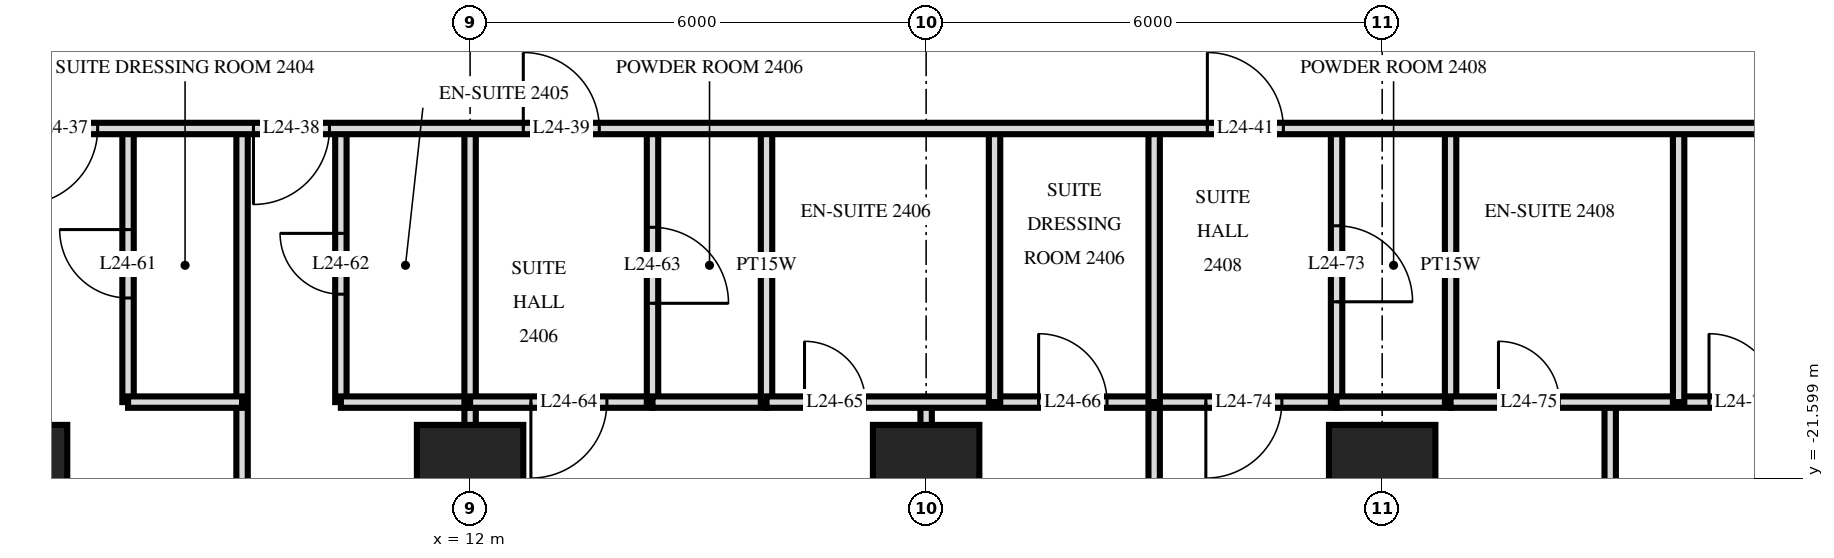
"""IFC4 building model, lengths in metres.
Left out: names, types, materials, properties, quantities, classifications, styles, units other than length and angle.
Written with IfcOpenShell. Run it as: python <this file> out.ifc"""

import sys

from ifc_helpers import new_model, si_unit, direction, frame, frame_2d, origin, origin_2d, place, context, subcontext, project, spatial, rectangle, extrude, element, fill, save


model = new_model("IFC4")
c1 = context("Model", 3, precision=1e-05, world=origin(), true_north=direction((0.0, 1.0)))
c2 = subcontext(c1, "Body", "Model", "MODEL_VIEW")
j1 = project(units=[si_unit("LENGTHUNIT", "METRE"), si_unit("PLANEANGLEUNIT", "RADIAN")], contexts=[c1])
p1 = place(None, origin())
s1 = spatial("IfcSite", under=j1, at=p1, CompositionType="ELEMENT")
p2 = place(p1, origin())
s2 = spatial("IfcBuilding", under=s1, at=p2, CompositionType="ELEMENT")
p3 = place(p2, frame((0.0, 0.0, 96.0)))
s3 = spatial("IfcBuildingStorey", under=s2, at=p3, CompositionType="ELEMENT", Elevation=96.0)
for number, where, z_axis, x_axis in (
    (1, (6.0, -21.6, 0.0), (0.0, 0.0, 1.0), (1.0, 0.0, 0.0)),
    (2, (12.0, -21.6, 0.0), (0.0, 0.0, 1.0), (1.0, 0.0, 0.0)),
    (3, (18.0, -21.6, 0.0), (0.0, 0.0, 1.0), (1.0, 0.0, 0.0)),
    (4, (24.0, -21.6, 0.0), (0.0, 0.0, 1.0), (1.0, 0.0, 0.0)),
):
    element("IfcColumn", number, at=place(p3, frame(where, z_axis=z_axis, x_axis=x_axis)), inside=s3, PredefinedType="COLUMN", context=c2, shape_type="SweptSolid", body=[
        extrude(rectangle(XDim=1.4, YDim=1.4, at=origin_2d()), origin(), (0.0, 0.0, 1.0), 3.6),
    ])
p4 = place(p3, frame((27.9, -20.6, 0.0), z_axis=(0.0, 0.0, 1.0), x_axis=(0.0, 1.0, 0.0)))
e5 = element("IfcWall", 5, at=p4, inside=s3, PredefinedType="PARTITIONING", context=c2, shape_type="SweptSolid", body=[
    extrude(rectangle(XDim=3.6, YDim=0.15, at=frame_2d((1.8, 0.0))), origin(), (0.0, 0.0, 1.0), 3.32),
])
p5 = place(p3, frame((27.0, -29.22, 0.0), z_axis=(0.0, 0.0, 1.0), x_axis=(0.0, 1.0, 0.0)))
e6 = element("IfcWall", 6, at=p5, inside=s3, PredefinedType="PARTITIONING", context=c2, shape_type="SweptSolid", body=[
    extrude(rectangle(XDim=8.62, YDim=0.15, at=frame_2d((4.31, 0.0))), origin(), (0.0, 0.0, 1.0), 3.32),
])
p6 = place(p5, frame((3.77, 0.0, 0.0)))
e7 = element("IfcOpeningElement", 7, at=p6, cuts=e6, PredefinedType="OPENING", context=c2, shape_type="SweptSolid", body=[
    extrude(rectangle(XDim=0.9, YDim=2.1, at=frame_2d((0.45, 1.05))), frame((0.0, 0.085, 0.0), z_axis=(0.0, -1.0, 0.0), x_axis=(1.0, 0.0, 0.0)), (0.0, 0.0, 1.0), 0.17),
])
p7 = place(p3, frame((24.9, -20.6, 0.0), z_axis=(0.0, 0.0, 1.0), x_axis=(0.0, 1.0, 0.0)))
e8 = element("IfcWall", 8, at=p7, inside=s3, PredefinedType="PLUMBINGWALL", context=c2, shape_type="SweptSolid", body=[
    extrude(rectangle(XDim=3.6, YDim=0.15, at=frame_2d((1.8, 0.0))), origin(), (0.0, 0.0, 1.0), 3.32),
])
p8 = place(p3, frame((23.4, -20.6, 0.0), z_axis=(0.0, 0.0, 1.0), x_axis=(0.0, 1.0, 0.0)))
e9 = element("IfcWall", 9, at=p8, inside=s3, PredefinedType="PARTITIONING", context=c2, shape_type="SweptSolid", body=[
    extrude(rectangle(XDim=3.6, YDim=0.15, at=frame_2d((1.8, 0.0))), origin(), (0.0, 0.0, 1.0), 3.32),
])
p9 = place(p8, frame((1.32, 0.0, 0.0)))
e10 = element("IfcOpeningElement", 10, at=p9, cuts=e9, PredefinedType="OPENING", context=c2, shape_type="SweptSolid", body=[
    extrude(rectangle(XDim=1.0, YDim=2.1, at=frame_2d((0.5, 1.05))), frame((0.0, 0.085, 0.0), z_axis=(0.0, -1.0, 0.0), x_axis=(1.0, 0.0, 0.0)), (0.0, 0.0, 1.0), 0.17),
])
p10 = place(p3, frame((21.0, -20.6, 0.0), z_axis=(0.0, 0.0, 1.0), x_axis=(0.0, 1.0, 0.0)))
e11 = element("IfcWall", 11, at=p10, inside=s3, PredefinedType="PARTITIONING", context=c2, shape_type="SweptSolid", body=[
    extrude(rectangle(XDim=3.6, YDim=0.15, at=frame_2d((1.8, 0.0))), origin(), (0.0, 0.0, 1.0), 3.32),
])
p11 = place(p3, frame((21.0, -29.22, 0.0), z_axis=(0.0, 0.0, 1.0), x_axis=(0.0, 1.0, 0.0)))
e12 = element("IfcWall", 12, at=p11, inside=s3, PredefinedType="PARTITIONING", context=c2, shape_type="SweptSolid", body=[
    extrude(rectangle(XDim=8.62, YDim=0.15, at=frame_2d((4.31, 0.0))), origin(), (0.0, 0.0, 1.0), 3.32),
])
p12 = place(p3, frame((18.9, -20.6, 0.0), z_axis=(0.0, 0.0, 1.0), x_axis=(0.0, 1.0, 0.0)))
e13 = element("IfcWall", 13, at=p12, inside=s3, PredefinedType="PARTITIONING", context=c2, shape_type="SweptSolid", body=[
    extrude(rectangle(XDim=3.6, YDim=0.15, at=frame_2d((1.8, 0.0))), origin(), (0.0, 0.0, 1.0), 3.32),
])
p13 = place(p3, frame((18.0, -29.22, 0.0), z_axis=(0.0, 0.0, 1.0), x_axis=(0.0, 1.0, 0.0)))
e14 = element("IfcWall", 14, at=p13, inside=s3, PredefinedType="PARTITIONING", context=c2, shape_type="SweptSolid", body=[
    extrude(rectangle(XDim=8.62, YDim=0.15, at=frame_2d((4.31, 0.0))), origin(), (0.0, 0.0, 1.0), 3.32),
])
p14 = place(p13, frame((3.75, 0.0, 0.0)))
e15 = element("IfcOpeningElement", 15, at=p14, cuts=e14, PredefinedType="OPENING", context=c2, shape_type="SweptSolid", body=[
    extrude(rectangle(XDim=0.9, YDim=2.1, at=frame_2d((0.45, 1.05))), frame((0.0, 0.085, 0.0), z_axis=(0.0, -1.0, 0.0), x_axis=(1.0, 0.0, 0.0)), (0.0, 0.0, 1.0), 0.17),
])
p15 = place(p3, frame((15.9, -20.6, 0.0), z_axis=(0.0, 0.0, 1.0), x_axis=(0.0, 1.0, 0.0)))
e16 = element("IfcWall", 16, at=p15, inside=s3, PredefinedType="PLUMBINGWALL", context=c2, shape_type="SweptSolid", body=[
    extrude(rectangle(XDim=3.6, YDim=0.15, at=frame_2d((1.8, 0.0))), origin(), (0.0, 0.0, 1.0), 3.32),
])
p16 = place(p3, frame((14.4, -20.6, 0.0), z_axis=(0.0, 0.0, 1.0), x_axis=(0.0, 1.0, 0.0)))
e17 = element("IfcWall", 17, at=p16, inside=s3, PredefinedType="PARTITIONING", context=c2, shape_type="SweptSolid", body=[
    extrude(rectangle(XDim=3.6, YDim=0.15, at=frame_2d((1.8, 0.0))), origin(), (0.0, 0.0, 1.0), 3.32),
])
p17 = place(p16, frame((1.3, 0.0, 0.0)))
e18 = element("IfcOpeningElement", 18, at=p17, cuts=e17, PredefinedType="OPENING", context=c2, shape_type="SweptSolid", body=[
    extrude(rectangle(XDim=1.0, YDim=2.1, at=frame_2d((0.5, 1.05))), frame((0.0, 0.085, 0.0), z_axis=(0.0, -1.0, 0.0), x_axis=(1.0, 0.0, 0.0)), (0.0, 0.0, 1.0), 0.17),
])
p18 = place(p3, frame((12.0, -20.6, 0.0), z_axis=(0.0, 0.0, 1.0), x_axis=(0.0, 1.0, 0.0)))
e19 = element("IfcWall", 19, at=p18, inside=s3, PredefinedType="PARTITIONING", context=c2, shape_type="SweptSolid", body=[
    extrude(rectangle(XDim=3.6, YDim=0.15, at=frame_2d((1.8, 0.0))), origin(), (0.0, 0.0, 1.0), 3.32),
])
p19 = place(p3, frame((12.0, -29.22, 0.0), z_axis=(0.0, 0.0, 1.0), x_axis=(0.0, 1.0, 0.0)))
e20 = element("IfcWall", 20, at=p19, inside=s3, PredefinedType="PARTITIONING", context=c2, shape_type="SweptSolid", body=[
    extrude(rectangle(XDim=8.62, YDim=0.15, at=frame_2d((4.31, 0.0))), origin(), (0.0, 0.0, 1.0), 3.32),
])
p20 = place(p3, frame((10.3, -20.6, 0.0), z_axis=(0.0, 0.0, 1.0), x_axis=(0.0, 1.0, 0.0)))
e21 = element("IfcWall", 21, at=p20, inside=s3, PredefinedType="PARTITIONING", context=c2, shape_type="SweptSolid", body=[
    extrude(rectangle(XDim=3.6, YDim=0.15, at=frame_2d((1.8, 0.0))), origin(), (0.0, 0.0, 1.0), 3.32),
])
p21 = place(p20, frame((1.42, 0.0, 0.0)))
e22 = element("IfcOpeningElement", 22, at=p21, cuts=e21, PredefinedType="OPENING", context=c2, shape_type="SweptSolid", body=[
    extrude(rectangle(XDim=0.8, YDim=2.1, at=frame_2d((0.4, 1.05))), frame((0.0, 0.085, 0.0), z_axis=(0.0, -1.0, 0.0), x_axis=(1.0, 0.0, 0.0)), (0.0, 0.0, 1.0), 0.17),
])
p22 = place(p3, frame((9.0, -29.22, 0.0), z_axis=(0.0, 0.0, 1.0), x_axis=(0.0, 1.0, 0.0)))
e23 = element("IfcWall", 23, at=p22, inside=s3, PredefinedType="PARTITIONING", context=c2, shape_type="SweptSolid", body=[
    extrude(rectangle(XDim=12.22, YDim=0.15, at=frame_2d((6.11, 0.0))), origin(), (0.0, 0.0, 1.0), 3.32),
])
p23 = place(p3, frame((7.5, -20.6, 0.0), z_axis=(0.0, 0.0, 1.0), x_axis=(0.0, 1.0, 0.0)))
e24 = element("IfcWall", 24, at=p23, inside=s3, PredefinedType="PARTITIONING", context=c2, shape_type="SweptSolid", body=[
    extrude(rectangle(XDim=3.6, YDim=0.15, at=frame_2d((1.8, 0.0))), origin(), (0.0, 0.0, 1.0), 3.32),
])
p24 = place(p23, frame((1.37, 0.0, 0.0)))
e25 = element("IfcOpeningElement", 25, at=p24, cuts=e24, PredefinedType="OPENING", context=c2, shape_type="SweptSolid", body=[
    extrude(rectangle(XDim=0.9, YDim=2.1, at=frame_2d((0.45, 1.05))), frame((0.0, 0.085, 0.0), z_axis=(0.0, -1.0, 0.0), x_axis=(1.0, 0.0, 0.0)), (0.0, 0.0, 1.0), 0.17),
])
p25 = place(p3, frame((12.0, -20.6, 0.0), z_axis=(0.0, 0.0, 1.0), x_axis=(1.0, 0.0, 0.0)))
e26 = element("IfcWall", 26, at=p25, inside=s3, PredefinedType="PARTITIONING", context=c2, shape_type="SweptSolid", body=[
    extrude(rectangle(XDim=2.4, YDim=0.15, at=frame_2d((1.2, 0.0))), origin(), (0.0, 0.0, 1.0), 3.32),
])
p26 = place(p25, frame((0.8, 0.0, 0.0)))
e27 = element("IfcOpeningElement", 27, at=p26, cuts=e26, PredefinedType="OPENING", context=c2, shape_type="SweptSolid", body=[
    extrude(rectangle(XDim=1.0, YDim=2.1, at=frame_2d((0.5, 1.05))), frame((0.0, 0.085, 0.0), z_axis=(0.0, -1.0, 0.0), x_axis=(1.0, 0.0, 0.0)), (0.0, 0.0, 1.0), 0.17),
])
p27 = place(p3, frame((21.0, -20.6, 0.0), z_axis=(0.0, 0.0, 1.0), x_axis=(1.0, 0.0, 0.0)))
e28 = element("IfcWall", 28, at=p27, inside=s3, PredefinedType="PARTITIONING", context=c2, shape_type="SweptSolid", body=[
    extrude(rectangle(XDim=2.4, YDim=0.15, at=frame_2d((1.2, 0.0))), origin(), (0.0, 0.0, 1.0), 3.32),
])
p28 = place(p27, frame((0.68, 0.0, 0.0)))
e29 = element("IfcOpeningElement", 29, at=p28, cuts=e28, PredefinedType="OPENING", context=c2, shape_type="SweptSolid", body=[
    extrude(rectangle(XDim=1.0, YDim=2.1, at=frame_2d((0.5, 1.05))), frame((0.0, 0.085, 0.0), z_axis=(0.0, -1.0, 0.0), x_axis=(1.0, 0.0, 0.0)), (0.0, 0.0, 1.0), 0.17),
])
p29 = place(p3, frame((7.5, -20.6, 0.0), z_axis=(0.0, 0.0, 1.0), x_axis=(1.0, 0.0, 0.0)))
e30 = element("IfcWall", 30, at=p29, inside=s3, PredefinedType="PARTITIONING", context=c2, shape_type="SweptSolid", body=[
    extrude(rectangle(XDim=1.5, YDim=0.15, at=frame_2d((0.75, 0.0))), origin(), (0.0, 0.0, 1.0), 3.32),
])
p30 = place(p3, frame((10.3, -20.6, 0.0), z_axis=(0.0, 0.0, 1.0), x_axis=(1.0, 0.0, 0.0)))
e31 = element("IfcWall", 31, at=p30, inside=s3, PredefinedType="PARTITIONING", context=c2, shape_type="SweptSolid", body=[
    extrude(rectangle(XDim=1.7, YDim=0.15, at=frame_2d((0.85, 0.0))), origin(), (0.0, 0.0, 1.0), 3.32),
])
p31 = place(p3, frame((15.9, -20.6, 0.0), z_axis=(0.0, 0.0, 1.0), x_axis=(1.0, 0.0, 0.0)))
e32 = element("IfcWall", 32, at=p31, inside=s3, PredefinedType="PARTITIONING", context=c2, shape_type="SweptSolid", body=[
    extrude(rectangle(XDim=5.1, YDim=0.15, at=frame_2d((2.55, 0.0))), origin(), (0.0, 0.0, 1.0), 3.32),
])
p32 = place(p31, frame((0.5, 0.0, 0.0)))
e33 = element("IfcOpeningElement", 33, at=p32, cuts=e32, PredefinedType="OPENING", context=c2, shape_type="SweptSolid", body=[
    extrude(rectangle(XDim=0.8, YDim=2.1, at=frame_2d((0.4, 1.05))), frame((0.0, 0.085, 0.0), z_axis=(0.0, -1.0, 0.0), x_axis=(1.0, 0.0, 0.0)), (0.0, 0.0, 1.0), 0.17),
])
p33 = place(p31, frame((3.58, 0.0, 0.0)))
e34 = element("IfcOpeningElement", 34, at=p33, cuts=e32, PredefinedType="OPENING", context=c2, shape_type="SweptSolid", body=[
    extrude(rectangle(XDim=0.9, YDim=2.1, at=frame_2d((0.45, 1.05))), frame((0.0, 0.085, 0.0), z_axis=(0.0, -1.0, 0.0), x_axis=(1.0, 0.0, 0.0)), (0.0, 0.0, 1.0), 0.17),
])
p34 = place(p3, frame((24.9, -20.6, 0.0), z_axis=(0.0, 0.0, 1.0), x_axis=(1.0, 0.0, 0.0)))
e35 = element("IfcWall", 35, at=p34, inside=s3, PredefinedType="PARTITIONING", context=c2, shape_type="SweptSolid", body=[
    extrude(rectangle(XDim=8.22, YDim=0.15, at=frame_2d((4.11, 0.0))), origin(), (0.0, 0.0, 1.0), 3.32),
])
p35 = place(p34, frame((0.63, 0.0, 0.0)))
e36 = element("IfcOpeningElement", 36, at=p35, cuts=e35, PredefinedType="OPENING", context=c2, shape_type="SweptSolid", body=[
    extrude(rectangle(XDim=0.8, YDim=2.1, at=frame_2d((0.4, 1.05))), frame((0.0, 0.085, 0.0), z_axis=(0.0, -1.0, 0.0), x_axis=(1.0, 0.0, 0.0)), (0.0, 0.0, 1.0), 0.17),
])
p36 = place(p34, frame((3.4, 0.0, 0.0)))
e37 = element("IfcOpeningElement", 37, at=p36, cuts=e35, PredefinedType="OPENING", context=c2, shape_type="SweptSolid", body=[
    extrude(rectangle(XDim=0.9, YDim=2.1, at=frame_2d((0.45, 1.05))), frame((0.0, 0.085, 0.0), z_axis=(0.0, -1.0, 0.0), x_axis=(1.0, 0.0, 0.0)), (0.0, 0.0, 1.0), 0.17),
])
for number, where, z_axis, x_axis in (
    (38, (14.4, -20.6, 0.0), (0.0, 0.0, 1.0), (1.0, 0.0, 0.0)),
    (39, (23.4, -20.6, 0.0), (0.0, 0.0, 1.0), (1.0, 0.0, 0.0)),
):
    element("IfcWall", number, at=place(p3, frame(where, z_axis=z_axis, x_axis=x_axis)), inside=s3, PredefinedType="PLUMBINGWALL", context=c2, shape_type="SweptSolid", body=[
        extrude(rectangle(XDim=1.5, YDim=0.15, at=frame_2d((0.75, 0.0))), origin(), (0.0, 0.0, 1.0), 3.32),
    ])
p37 = place(p3, frame((-33.12, -17.0, 0.0), z_axis=(0.0, 0.0, 1.0), x_axis=(1.0, 0.0, 0.0)))
e40 = element("IfcWall", 40, at=p37, inside=s3, PredefinedType="PARTITIONING", context=c2, shape_type="SweptSolid", body=[
    extrude(rectangle(XDim=66.24, YDim=0.15, at=frame_2d((33.12, 0.0))), origin(), (0.0, 0.0, 1.0), 3.32),
])
p38 = place(p37, frame((16.27, 0.0, 0.0)))
e41 = element("IfcOpeningElement", 41, at=p38, cuts=e40, PredefinedType="OPENING", context=c2, shape_type="SweptSolid", body=[
    extrude(rectangle(XDim=1.0, YDim=2.1, at=frame_2d((0.5, 1.05))), frame((0.0, 0.085, 0.0), z_axis=(0.0, -1.0, 0.0), x_axis=(1.0, 0.0, 0.0)), (0.0, 0.0, 1.0), 0.17),
])
p39 = place(p37, frame((22.97, 0.0, 0.0)))
e42 = element("IfcOpeningElement", 42, at=p39, cuts=e40, PredefinedType="OPENING", context=c2, shape_type="SweptSolid", body=[
    extrude(rectangle(XDim=1.0, YDim=2.1, at=frame_2d((0.5, 1.05))), frame((0.0, 0.085, 0.0), z_axis=(0.0, -1.0, 0.0), x_axis=(1.0, 0.0, 0.0)), (0.0, 0.0, 1.0), 0.17),
])
p40 = place(p37, frame((34.42, 0.0, 0.0)))
e43 = element("IfcOpeningElement", 43, at=p40, cuts=e40, PredefinedType="OPENING", context=c2, shape_type="SweptSolid", body=[
    extrude(rectangle(XDim=1.0, YDim=2.1, at=frame_2d((0.5, 1.05))), frame((0.0, 0.085, 0.0), z_axis=(0.0, -1.0, 0.0), x_axis=(1.0, 0.0, 0.0)), (0.0, 0.0, 1.0), 0.17),
])
p41 = place(p37, frame((39.22, 0.0, 0.0)))
e44 = element("IfcOpeningElement", 44, at=p41, cuts=e40, PredefinedType="OPENING", context=c2, shape_type="SweptSolid", body=[
    extrude(rectangle(XDim=1.0, YDim=2.1, at=frame_2d((0.5, 1.05))), frame((0.0, 0.085, 0.0), z_axis=(0.0, -1.0, 0.0), x_axis=(1.0, 0.0, 0.0)), (0.0, 0.0, 1.0), 0.17),
])
p42 = place(p37, frame((42.27, 0.0, 0.0)))
e45 = element("IfcOpeningElement", 45, at=p42, cuts=e40, PredefinedType="OPENING", context=c2, shape_type="SweptSolid", body=[
    extrude(rectangle(XDim=1.0, YDim=2.1, at=frame_2d((0.5, 1.05))), frame((0.0, 0.085, 0.0), z_axis=(0.0, -1.0, 0.0), x_axis=(1.0, 0.0, 0.0)), (0.0, 0.0, 1.0), 0.17),
])
p43 = place(p37, frame((45.82, 0.0, 0.0)))
e46 = element("IfcOpeningElement", 46, at=p43, cuts=e40, PredefinedType="OPENING", context=c2, shape_type="SweptSolid", body=[
    extrude(rectangle(XDim=1.0, YDim=2.1, at=frame_2d((0.5, 1.05))), frame((0.0, 0.085, 0.0), z_axis=(0.0, -1.0, 0.0), x_axis=(1.0, 0.0, 0.0)), (0.0, 0.0, 1.0), 0.17),
])
p44 = place(p37, frame((13.42, 0.0, 0.0)))
e47 = element("IfcOpeningElement", 47, at=p44, cuts=e40, PredefinedType="OPENING", context=c2, shape_type="SweptSolid", body=[
    extrude(rectangle(XDim=1.0, YDim=2.1, at=frame_2d((0.5, 1.05))), frame((0.0, 0.085, 0.0), z_axis=(0.0, -1.0, 0.0), x_axis=(1.0, 0.0, 0.0)), (0.0, 0.0, 1.0), 0.17),
])
p45 = place(p37, frame((54.82, 0.0, 0.0)))
e48 = element("IfcOpeningElement", 48, at=p45, cuts=e40, PredefinedType="OPENING", context=c2, shape_type="SweptSolid", body=[
    extrude(rectangle(XDim=1.0, YDim=2.1, at=frame_2d((0.5, 1.05))), frame((0.0, 0.085, 0.0), z_axis=(0.0, -1.0, 0.0), x_axis=(1.0, 0.0, 0.0)), (0.0, 0.0, 1.0), 0.17),
])
p46 = place(p41, frame((0.5, 0.0, 0.0), z_axis=(0.0, 0.0, 1.0), x_axis=(-1.0, 0.0, 0.0)))
e49 = element("IfcDoor", 49, at=p46, inside=s3, OperationType="SINGLE_SWING_LEFT", PredefinedType="DOOR", context=c2, shape_type="SweptSolid", body=[
    extrude(rectangle(XDim=1.0, YDim=2.1, at=frame_2d((0.0, 1.05))), frame((0.0, -0.025, 0.0), z_axis=(0.0, 1.0, 0.0), x_axis=(-1.0, 0.0, 0.0)), (0.0, 0.0, 1.0), 0.05),
])
fill(e44, e49)
p47 = place(p42, frame((0.5, 0.0, 0.0), z_axis=(0.0, 0.0, 1.0), x_axis=(-1.0, 0.0, 0.0)))
e50 = element("IfcDoor", 50, at=p47, inside=s3, OperationType="SINGLE_SWING_LEFT", PredefinedType="DOOR", context=c2, shape_type="SweptSolid", body=[
    extrude(rectangle(XDim=1.0, YDim=2.1, at=frame_2d((0.0, 1.05))), frame((0.0, -0.025, 0.0), z_axis=(0.0, 1.0, 0.0), x_axis=(-1.0, 0.0, 0.0)), (0.0, 0.0, 1.0), 0.05),
])
fill(e45, e50)
p48 = place(p43, origin())
e51 = element("IfcDoor", 51, at=p48, inside=s3, OperationType="SINGLE_SWING_RIGHT", PredefinedType="DOOR", context=c2, shape_type="SweptSolid", body=[
    extrude(rectangle(XDim=1.0, YDim=2.1, at=frame_2d((0.5, 1.05))), frame((0.0, 0.025, 0.0), z_axis=(0.0, -1.0, 0.0), x_axis=(1.0, 0.0, 0.0)), (0.0, 0.0, 1.0), 0.05),
])
fill(e46, e51)
p49 = place(p45, origin())
e52 = element("IfcDoor", 52, at=p49, inside=s3, OperationType="SINGLE_SWING_RIGHT", PredefinedType="DOOR", context=c2, shape_type="SweptSolid", body=[
    extrude(rectangle(XDim=1.0, YDim=2.1, at=frame_2d((0.5, 1.05))), frame((0.0, 0.025, 0.0), z_axis=(0.0, -1.0, 0.0), x_axis=(1.0, 0.0, 0.0)), (0.0, 0.0, 1.0), 0.05),
])
fill(e48, e52)
p50 = place(p24, origin())
e53 = element("IfcDoor", 53, at=p50, inside=s3, OperationType="SINGLE_SWING_LEFT", PredefinedType="DOOR", context=c2, shape_type="SweptSolid", body=[
    extrude(rectangle(XDim=0.9, YDim=2.1, at=frame_2d((0.45, 1.05))), frame((0.0, 0.025, 0.0), z_axis=(0.0, -1.0, 0.0), x_axis=(1.0, 0.0, 0.0)), (0.0, 0.0, 1.0), 0.05),
])
fill(e25, e53)
p51 = place(p21, origin())
e54 = element("IfcDoor", 54, at=p51, inside=s3, OperationType="SINGLE_SWING_LEFT", PredefinedType="DOOR", context=c2, shape_type="SweptSolid", body=[
    extrude(rectangle(XDim=0.8, YDim=2.1, at=frame_2d((0.4, 1.05))), frame((0.0, 0.025, 0.0), z_axis=(0.0, -1.0, 0.0), x_axis=(1.0, 0.0, 0.0)), (0.0, 0.0, 1.0), 0.05),
])
fill(e22, e54)
p52 = place(p17, frame((0.5, 0.0, 0.0), z_axis=(0.0, 0.0, 1.0), x_axis=(-1.0, 0.0, 0.0)))
e55 = element("IfcDoor", 55, at=p52, inside=s3, OperationType="SINGLE_SWING_LEFT", PredefinedType="DOOR", context=c2, shape_type="SweptSolid", body=[
    extrude(rectangle(XDim=1.0, YDim=2.1, at=frame_2d((0.0, 1.05))), frame((0.0, -0.025, 0.0), z_axis=(0.0, 1.0, 0.0), x_axis=(-1.0, 0.0, 0.0)), (0.0, 0.0, 1.0), 0.05),
])
fill(e18, e55)
p53 = place(p26, frame((0.5, 0.0, 0.0), z_axis=(0.0, 0.0, 1.0), x_axis=(-1.0, 0.0, 0.0)))
e56 = element("IfcDoor", 56, at=p53, inside=s3, OperationType="SINGLE_SWING_LEFT", PredefinedType="DOOR", context=c2, shape_type="SweptSolid", body=[
    extrude(rectangle(XDim=1.0, YDim=2.1, at=frame_2d((0.0, 1.05))), frame((0.0, -0.025, 0.0), z_axis=(0.0, 1.0, 0.0), x_axis=(-1.0, 0.0, 0.0)), (0.0, 0.0, 1.0), 0.05),
])
fill(e27, e56)
p54 = place(p32, origin())
e57 = element("IfcDoor", 57, at=p54, inside=s3, OperationType="SINGLE_SWING_RIGHT", PredefinedType="DOOR", context=c2, shape_type="SweptSolid", body=[
    extrude(rectangle(XDim=0.8, YDim=2.1, at=frame_2d((0.4, 1.05))), frame((0.0, 0.025, 0.0), z_axis=(0.0, -1.0, 0.0), x_axis=(1.0, 0.0, 0.0)), (0.0, 0.0, 1.0), 0.05),
])
fill(e33, e57)
p55 = place(p33, origin())
e58 = element("IfcDoor", 58, at=p55, inside=s3, OperationType="SINGLE_SWING_RIGHT", PredefinedType="DOOR", context=c2, shape_type="SweptSolid", body=[
    extrude(rectangle(XDim=0.9, YDim=2.1, at=frame_2d((0.45, 1.05))), frame((0.0, 0.025, 0.0), z_axis=(0.0, -1.0, 0.0), x_axis=(1.0, 0.0, 0.0)), (0.0, 0.0, 1.0), 0.05),
])
fill(e34, e58)
p56 = place(p9, frame((0.5, 0.0, 0.0), z_axis=(0.0, 0.0, 1.0), x_axis=(-1.0, 0.0, 0.0)))
e59 = element("IfcDoor", 59, at=p56, inside=s3, OperationType="SINGLE_SWING_LEFT", PredefinedType="DOOR", context=c2, shape_type="SweptSolid", body=[
    extrude(rectangle(XDim=1.0, YDim=2.1, at=frame_2d((0.0, 1.05))), frame((0.0, -0.025, 0.0), z_axis=(0.0, 1.0, 0.0), x_axis=(-1.0, 0.0, 0.0)), (0.0, 0.0, 1.0), 0.05),
])
fill(e10, e59)
p57 = place(p28, frame((0.5, 0.0, 0.0), z_axis=(0.0, 0.0, 1.0), x_axis=(-1.0, 0.0, 0.0)))
e60 = element("IfcDoor", 60, at=p57, inside=s3, OperationType="SINGLE_SWING_LEFT", PredefinedType="DOOR", context=c2, shape_type="SweptSolid", body=[
    extrude(rectangle(XDim=1.0, YDim=2.1, at=frame_2d((0.0, 1.05))), frame((0.0, -0.025, 0.0), z_axis=(0.0, 1.0, 0.0), x_axis=(-1.0, 0.0, 0.0)), (0.0, 0.0, 1.0), 0.05),
])
fill(e29, e60)
p58 = place(p35, origin())
e61 = element("IfcDoor", 61, at=p58, inside=s3, OperationType="SINGLE_SWING_RIGHT", PredefinedType="DOOR", context=c2, shape_type="SweptSolid", body=[
    extrude(rectangle(XDim=0.8, YDim=2.1, at=frame_2d((0.4, 1.05))), frame((0.0, 0.025, 0.0), z_axis=(0.0, -1.0, 0.0), x_axis=(1.0, 0.0, 0.0)), (0.0, 0.0, 1.0), 0.05),
])
fill(e36, e61)
p59 = place(p36, origin())
e62 = element("IfcDoor", 62, at=p59, inside=s3, OperationType="SINGLE_SWING_RIGHT", PredefinedType="DOOR", context=c2, shape_type="SweptSolid", body=[
    extrude(rectangle(XDim=0.9, YDim=2.1, at=frame_2d((0.45, 1.05))), frame((0.0, 0.025, 0.0), z_axis=(0.0, -1.0, 0.0), x_axis=(1.0, 0.0, 0.0)), (0.0, 0.0, 1.0), 0.05),
])
fill(e37, e62)
save(model, sys.argv[1])
